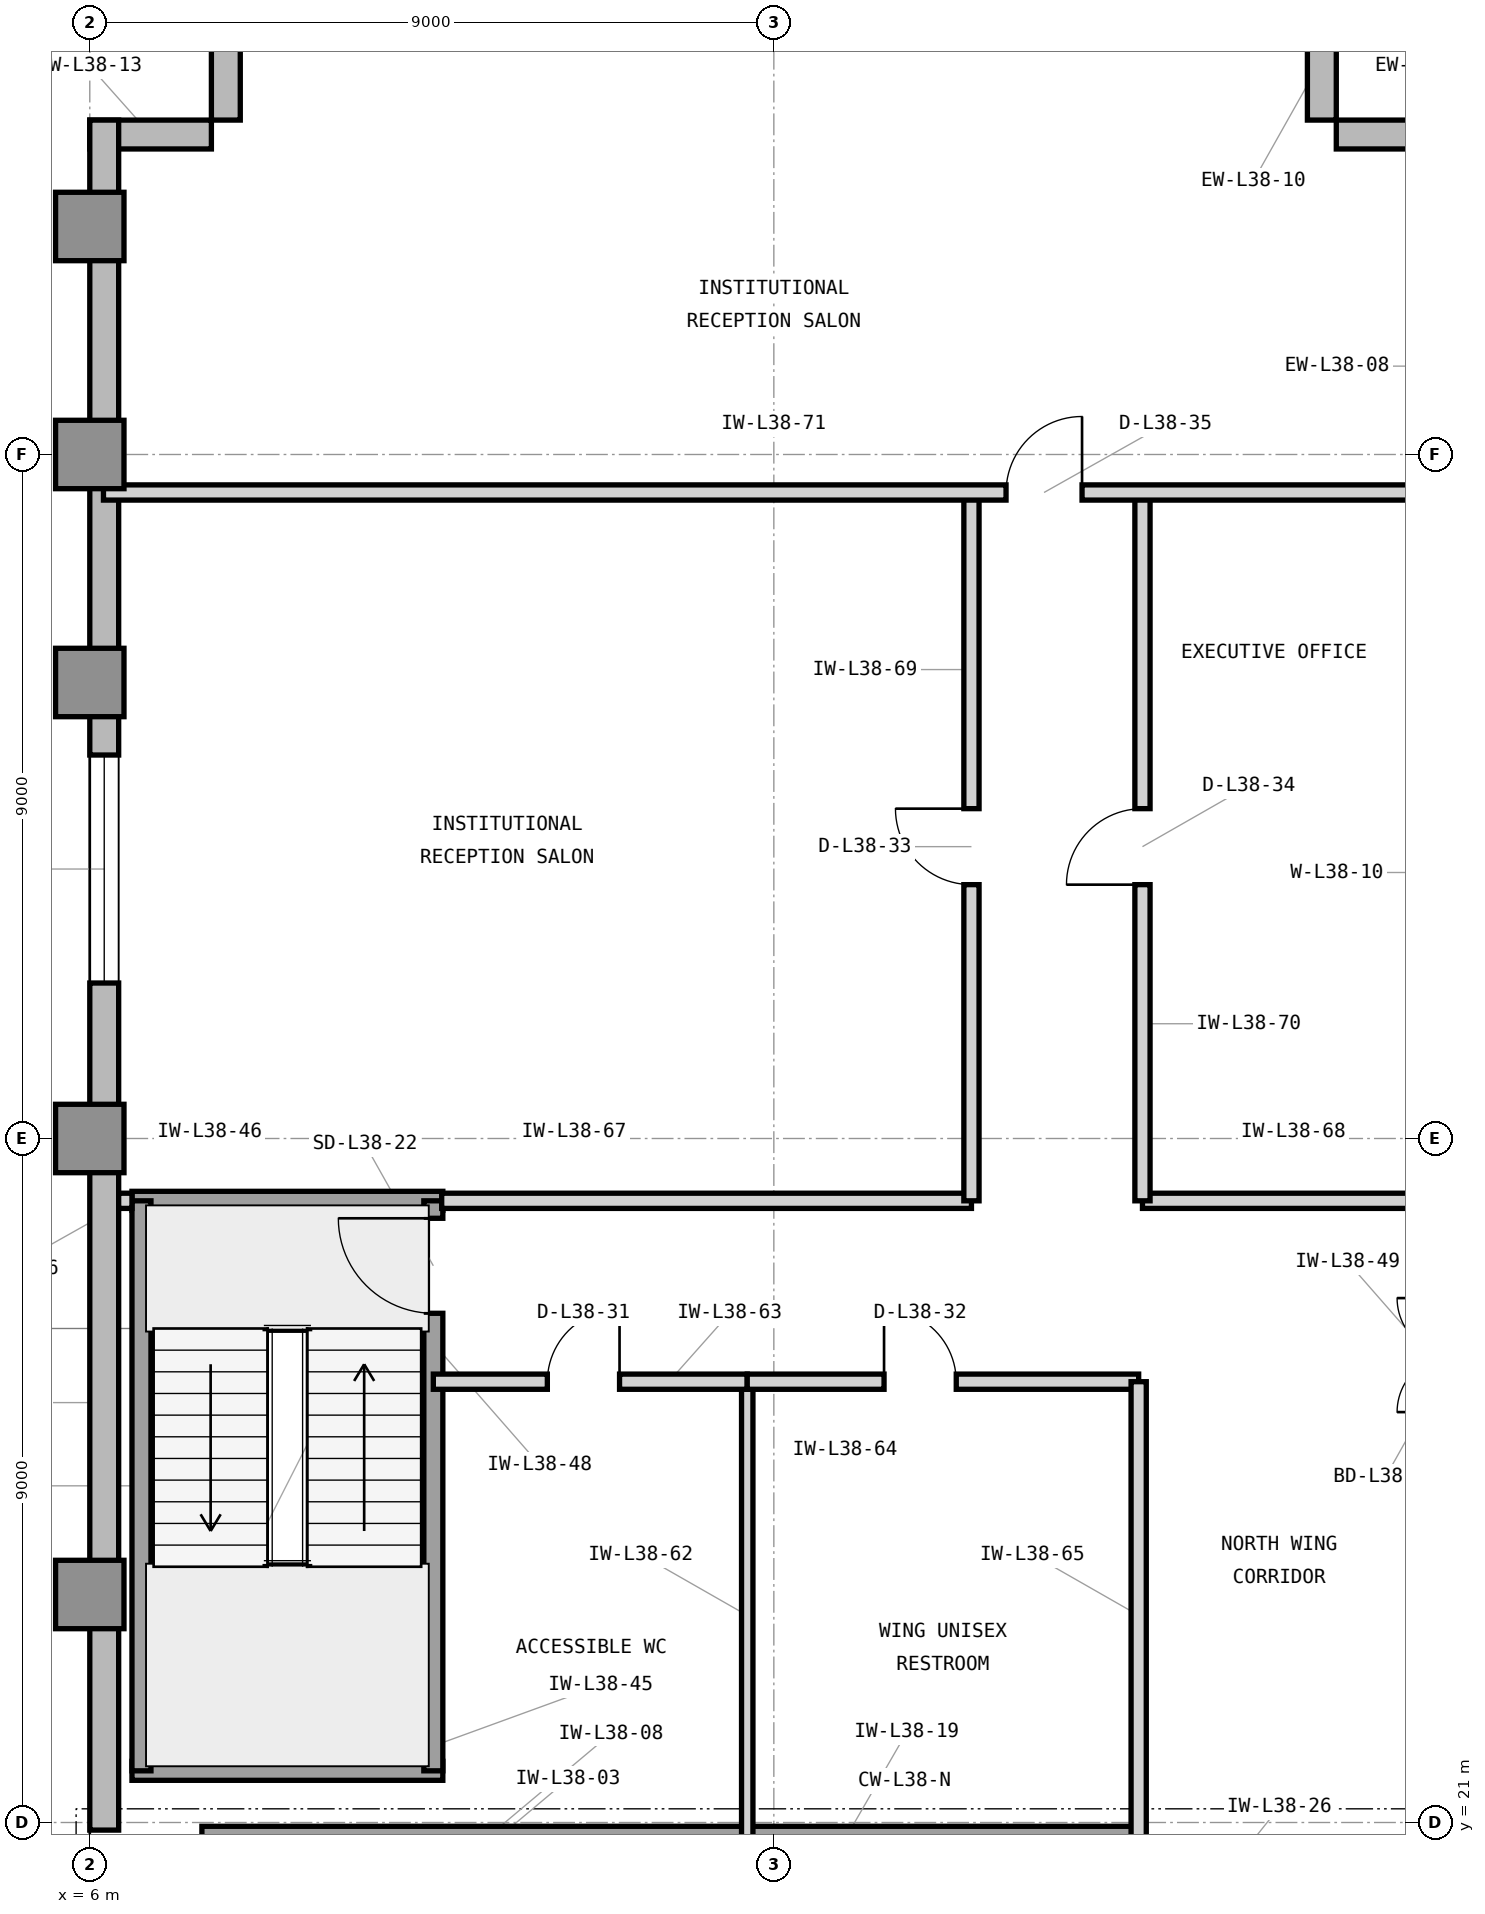
"""IFC4 building model, lengths in metres.
Left out: names, types, materials, properties, quantities, classifications, styles, units other than length and angle.
Written with IfcOpenShell. Run it as: python <this file> out.ifc"""

import sys

from ifc_helpers import new_model, si_unit, direction, frame, frame_2d, origin, origin_2d, place, context, subcontext, project, spatial, rectangle, extrude, element, fill, save


model = new_model("IFC4")
c1 = context("Model", 3, precision=1e-05, world=origin(), true_north=direction((0.0, 1.0)))
c2 = subcontext(c1, "Body", "Model", "MODEL_VIEW")
j1 = project(units=[si_unit("LENGTHUNIT", "METRE"), si_unit("PLANEANGLEUNIT", "RADIAN")], contexts=[c1])
p1 = place(None, origin())
s1 = spatial("IfcSite", under=j1, at=p1, CompositionType="ELEMENT")
p2 = place(p1, origin())
s2 = spatial("IfcBuilding", under=s1, at=p2, CompositionType="ELEMENT")
p3 = place(p2, frame((0.0, 0.0, 160.2)))
s3 = spatial("IfcBuildingStorey", under=s2, at=p3, CompositionType="ELEMENT", Elevation=160.2)
p4 = place(p3, frame((7.475, 20.65, 0.0), z_axis=(0.0, 0.0, 1.0), x_axis=(1.0, 0.0, 0.0)))
e1 = element("IfcWall", 1, at=p4, inside=s3, PredefinedType="SHEAR", context=c2, shape_type="SweptSolid", body=[
    extrude(rectangle(XDim=12.325, YDim=0.6, at=frame_2d((6.163, 0.0))), origin(), (0.0, 0.0, 1.0), 4.2),
])
for number, where, z_axis, x_axis in (
    (2, (6.0, 24.0, 0.0), (0.0, 0.0, 1.0), (1.0, 0.0, 0.0)),
    (3, (6.0, 30.0, 0.0), (0.0, 0.0, 1.0), (1.0, 0.0, 0.0)),
    (4, (6.0, 36.0, 0.0), (0.0, 0.0, 1.0), (1.0, 0.0, 0.0)),
    (5, (6.0, 39.0, 0.0), (0.0, 0.0, 1.0), (1.0, 0.0, 0.0)),
    (6, (6.0, 42.0, 0.0), (0.0, 0.0, 1.0), (1.0, 0.0, 0.0)),
):
    element("IfcColumn", number, at=place(p3, frame(where, z_axis=z_axis, x_axis=x_axis)), inside=s3, PredefinedType="COLUMN", context=c2, shape_type="SweptSolid", body=[
        extrude(rectangle(XDim=0.9, YDim=0.9, at=origin_2d()), origin(), (0.0, 0.0, 1.0), 4.2),
    ])
for number, where, z_axis, x_axis in (
    (7, (24.0, 43.21, 0.0), (0.0, 0.0, 1.0), (-1.0, 0.0, 0.0)),
    (8, (22.21, 43.4, 0.0), (0.0, 0.0, 1.0), (0.0, 1.0, 0.0)),
    (9, (7.79, 45.0, 0.0), (0.0, 0.0, 1.0), (0.0, -1.0, 0.0)),
    (10, (7.6, 43.21, 0.0), (0.0, 0.0, 1.0), (-1.0, 0.0, 0.0)),
):
    element("IfcWall", number, at=place(p3, frame(where, z_axis=z_axis, x_axis=x_axis)), inside=s3, PredefinedType="STANDARD", context=c2, shape_type="SweptSolid", body=[
        extrude(rectangle(XDim=1.6, YDim=0.38, at=frame_2d((0.8, 0.0))), origin(), (0.0, 0.0, 1.0), 4.0),
    ])
p5 = place(p3, frame((6.19, 43.4, 0.0), z_axis=(0.0, 0.0, 1.0), x_axis=(0.0, -1.0, 0.0)))
e11 = element("IfcWall", 11, at=p5, inside=s3, PredefinedType="STANDARD", context=c2, shape_type="SweptSolid", body=[
    extrude(rectangle(XDim=22.5, YDim=0.38, at=frame_2d((11.25, 0.0))), origin(), (0.0, 0.0, 1.0), 4.0),
])
p6 = place(p5, frame((8.354, 0.0, 0.7)))
e12 = element("IfcOpeningElement", 12, at=p6, cuts=e11, PredefinedType="OPENING", context=c2, shape_type="SweptSolid", body=[
    extrude(rectangle(XDim=3.0, YDim=2.6, at=frame_2d((1.5, 1.3))), frame((0.0, 0.2, 0.0), z_axis=(0.0, -1.0, 0.0), x_axis=(1.0, 0.0, 0.0)), (0.0, 0.0, 1.0), 0.4),
])
for number, where, z_axis, x_axis in (
    (13, (6.555, 21.68, 0.0), (0.0, 0.0, 1.0), (1.0, 0.0, 0.0)),
    (14, (6.555, 29.18, 0.0), (0.0, 0.0, 1.0), (1.0, 0.0, 0.0)),
):
    element("IfcWall", number, at=place(p3, frame(where, z_axis=z_axis, x_axis=x_axis)), inside=s3, PredefinedType="SHEAR", context=c2, shape_type="SweptSolid", body=[
        extrude(rectangle(XDim=4.09, YDim=0.25, at=frame_2d((2.045, 0.0))), origin(), (0.0, 0.0, 1.0), 4.2),
    ])
p7 = place(p3, frame((6.68, 21.68, 0.0), z_axis=(0.0, 0.0, 1.0), x_axis=(0.0, 1.0, 0.0)))
e15 = element("IfcWall", 15, at=p7, inside=s3, PredefinedType="SHEAR", context=c2, shape_type="SweptSolid", body=[
    extrude(rectangle(XDim=7.5, YDim=0.25, at=frame_2d((3.75, 0.0))), origin(), (0.0, 0.0, 1.0), 4.2),
])
p8 = place(p3, frame((10.52, 21.68, 0.0), z_axis=(0.0, 0.0, 1.0), x_axis=(0.0, 1.0, 0.0)))
e16 = element("IfcWall", 16, at=p8, inside=s3, PredefinedType="SHEAR", context=c2, shape_type="SweptSolid", body=[
    extrude(rectangle(XDim=7.5, YDim=0.25, at=frame_2d((3.75, 0.0))), origin(), (0.0, 0.0, 1.0), 4.2),
])
p9 = place(p8, frame((6.02, 0.0, 0.0)))
e17 = element("IfcOpeningElement", 17, at=p9, cuts=e16, PredefinedType="OPENING", context=c2, shape_type="SweptSolid", body=[
    extrude(rectangle(XDim=1.25, YDim=2.2, at=frame_2d((0.625, 1.1))), frame((0.0, 0.135, 0.0), z_axis=(0.0, -1.0, 0.0), x_axis=(1.0, 0.0, 0.0)), (0.0, 0.0, 1.0), 0.27),
])
p10 = place(p3, frame((14.65, 20.65, 0.0), z_axis=(0.0, 0.0, 1.0), x_axis=(0.0, 1.0, 0.0)))
e18 = element("IfcWall", 18, at=p10, inside=s3, PredefinedType="PARTITIONING", context=c2, shape_type="SweptSolid", body=[
    extrude(rectangle(XDim=6.15, YDim=0.15, at=frame_2d((3.075, 0.0))), origin(), (0.0, 0.0, 1.0), 3.93),
])
p11 = place(p3, frame((10.52, 26.8, 0.0), z_axis=(0.0, 0.0, 1.0), x_axis=(1.0, 0.0, 0.0)))
e19 = element("IfcWall", 19, at=p11, inside=s3, PredefinedType="PARTITIONING", context=c2, shape_type="SweptSolid", body=[
    extrude(rectangle(XDim=4.13, YDim=0.2, at=frame_2d((2.065, 0.0))), origin(), (0.0, 0.0, 1.0), 3.93),
])
p12 = place(p11, frame((1.5, 0.0, 0.0)))
e20 = element("IfcOpeningElement", 20, at=p12, cuts=e19, PredefinedType="OPENING", context=c2, shape_type="SweptSolid", body=[
    extrude(rectangle(XDim=0.95, YDim=2.1, at=frame_2d((0.475, 1.05))), frame((0.0, 0.11, 0.0), z_axis=(0.0, -1.0, 0.0), x_axis=(1.0, 0.0, 0.0)), (0.0, 0.0, 1.0), 0.22),
])
p13 = place(p3, frame((14.65, 26.8, 0.0), z_axis=(0.0, 0.0, 1.0), x_axis=(1.0, 0.0, 0.0)))
e21 = element("IfcWall", 21, at=p13, inside=s3, PredefinedType="PARTITIONING", context=c2, shape_type="SweptSolid", body=[
    extrude(rectangle(XDim=5.15, YDim=0.2, at=frame_2d((2.575, 0.0))), origin(), (0.0, 0.0, 1.0), 3.93),
])
p14 = place(p13, frame((1.8, 0.0, 0.0)))
e22 = element("IfcOpeningElement", 22, at=p14, cuts=e21, PredefinedType="OPENING", context=c2, shape_type="SweptSolid", body=[
    extrude(rectangle(XDim=0.95, YDim=2.1, at=frame_2d((0.475, 1.05))), frame((0.0, 0.11, 0.0), z_axis=(0.0, -1.0, 0.0), x_axis=(1.0, 0.0, 0.0)), (0.0, 0.0, 1.0), 0.22),
])
p15 = place(p3, frame((19.8, 20.65, 0.0), z_axis=(0.0, 0.0, 1.0), x_axis=(0.0, 1.0, 0.0)))
e23 = element("IfcWall", 23, at=p15, inside=s3, PredefinedType="PARTITIONING", context=c2, shape_type="SweptSolid", body=[
    extrude(rectangle(XDim=6.15, YDim=0.2, at=frame_2d((3.075, 0.0))), origin(), (0.0, 0.0, 1.0), 3.93),
])
p16 = place(p3, frame((6.38, 29.18, 0.0), z_axis=(0.0, 0.0, 1.0), x_axis=(1.0, 0.0, 0.0)))
e24 = element("IfcWall", 24, at=p16, inside=s3, PredefinedType="PARTITIONING", context=c2, shape_type="SweptSolid", body=[
    extrude(rectangle(XDim=0.175, YDim=0.2, at=frame_2d((0.087, 0.0))), origin(), (0.0, 0.0, 1.0), 3.93),
])
p17 = place(p3, frame((10.63, 29.18, 0.0), z_axis=(0.0, 0.0, 1.0), x_axis=(1.0, 0.0, 0.0)))
e25 = element("IfcWall", 25, at=p17, inside=s3, PredefinedType="PARTITIONING", context=c2, shape_type="SweptSolid", body=[
    extrude(rectangle(XDim=6.97, YDim=0.2, at=frame_2d((3.485, 0.0))), origin(), (0.0, 0.0, 1.0), 3.93),
])
p18 = place(p3, frame((19.85, 29.18, 0.0), z_axis=(0.0, 0.0, 1.0), x_axis=(1.0, 0.0, 0.0)))
e26 = element("IfcWall", 26, at=p18, inside=s3, PredefinedType="PARTITIONING", context=c2, shape_type="SweptSolid", body=[
    extrude(rectangle(XDim=3.97, YDim=0.2, at=frame_2d((1.985, 0.0))), origin(), (0.0, 0.0, 1.0), 3.93),
])
p19 = place(p3, frame((17.6, 29.18, 0.0), z_axis=(0.0, 0.0, 1.0), x_axis=(0.0, 1.0, 0.0)))
e27 = element("IfcWall", 27, at=p19, inside=s3, PredefinedType="PARTITIONING", context=c2, shape_type="SweptSolid", body=[
    extrude(rectangle(XDim=9.32, YDim=0.2, at=frame_2d((4.66, 0.0))), origin(), (0.0, 0.0, 1.0), 3.93),
])
p20 = place(p19, frame((4.16, 0.0, 0.0)))
e28 = element("IfcOpeningElement", 28, at=p20, cuts=e27, PredefinedType="OPENING", context=c2, shape_type="SweptSolid", body=[
    extrude(rectangle(XDim=1.0, YDim=2.15, at=frame_2d((0.5, 1.075))), frame((0.0, 0.11, 0.0), z_axis=(0.0, -1.0, 0.0), x_axis=(1.0, 0.0, 0.0)), (0.0, 0.0, 1.0), 0.22),
])
p21 = place(p3, frame((19.85, 29.18, 0.0), z_axis=(0.0, 0.0, 1.0), x_axis=(0.0, 1.0, 0.0)))
e29 = element("IfcWall", 29, at=p21, inside=s3, PredefinedType="PARTITIONING", context=c2, shape_type="SweptSolid", body=[
    extrude(rectangle(XDim=9.32, YDim=0.2, at=frame_2d((4.66, 0.0))), origin(), (0.0, 0.0, 1.0), 3.93),
])
p22 = place(p21, frame((4.16, 0.0, 0.0)))
e30 = element("IfcOpeningElement", 30, at=p22, cuts=e29, PredefinedType="OPENING", context=c2, shape_type="SweptSolid", body=[
    extrude(rectangle(XDim=1.0, YDim=2.15, at=frame_2d((0.5, 1.075))), frame((0.0, 0.11, 0.0), z_axis=(0.0, -1.0, 0.0), x_axis=(1.0, 0.0, 0.0)), (0.0, 0.0, 1.0), 0.22),
])
p23 = place(p3, frame((6.18, 38.5, 0.0), z_axis=(0.0, 0.0, 1.0), x_axis=(1.0, 0.0, 0.0)))
e31 = element("IfcWall", 31, at=p23, inside=s3, PredefinedType="PARTITIONING", context=c2, shape_type="SweptSolid", body=[
    extrude(rectangle(XDim=17.64, YDim=0.2, at=frame_2d((8.82, 0.0))), origin(), (0.0, 0.0, 1.0), 3.93),
])
p24 = place(p23, frame((11.875, 0.0, 0.0)))
e32 = element("IfcOpeningElement", 32, at=p24, cuts=e31, PredefinedType="OPENING", context=c2, shape_type="SweptSolid", body=[
    extrude(rectangle(XDim=1.0, YDim=2.15, at=frame_2d((0.5, 1.075))), frame((0.0, 0.11, 0.0), z_axis=(0.0, -1.0, 0.0), x_axis=(1.0, 0.0, 0.0)), (0.0, 0.0, 1.0), 0.22),
])
p25 = place(p9, origin())
e33 = element("IfcDoor", 33, at=p25, inside=s3, OperationType="SINGLE_SWING_RIGHT", PredefinedType="DOOR", context=c2, shape_type="SweptSolid", body=[
    extrude(rectangle(XDim=1.25, YDim=2.2, at=frame_2d((0.625, 1.1))), frame((0.0, 0.025, 0.0), z_axis=(0.0, -1.0, 0.0), x_axis=(1.0, 0.0, 0.0)), (0.0, 0.0, 1.0), 0.05),
])
fill(e17, e33)
p26 = place(p12, origin())
e34 = element("IfcDoor", 34, at=p26, inside=s3, OperationType="SINGLE_SWING_RIGHT", PredefinedType="DOOR", context=c2, shape_type="SweptSolid", body=[
    extrude(rectangle(XDim=0.95, YDim=2.1, at=frame_2d((0.475, 1.05))), frame((0.0, 0.025, 0.0), z_axis=(0.0, -1.0, 0.0), x_axis=(1.0, 0.0, 0.0)), (0.0, 0.0, 1.0), 0.05),
])
fill(e20, e34)
p27 = place(p14, origin())
e35 = element("IfcDoor", 35, at=p27, inside=s3, OperationType="SINGLE_SWING_LEFT", PredefinedType="DOOR", context=c2, shape_type="SweptSolid", body=[
    extrude(rectangle(XDim=0.95, YDim=2.1, at=frame_2d((0.475, 1.05))), frame((0.0, 0.025, 0.0), z_axis=(0.0, -1.0, 0.0), x_axis=(1.0, 0.0, 0.0)), (0.0, 0.0, 1.0), 0.05),
])
fill(e22, e35)
p28 = place(p20, origin())
e36 = element("IfcDoor", 36, at=p28, inside=s3, OperationType="SINGLE_SWING_RIGHT", PredefinedType="DOOR", context=c2, shape_type="SweptSolid", body=[
    extrude(rectangle(XDim=1.0, YDim=2.15, at=frame_2d((0.5, 1.075))), frame((0.0, 0.025, 0.0), z_axis=(0.0, -1.0, 0.0), x_axis=(1.0, 0.0, 0.0)), (0.0, 0.0, 1.0), 0.05),
])
fill(e28, e36)
p29 = place(p22, origin())
e37 = element("IfcDoor", 37, at=p29, inside=s3, OperationType="SINGLE_SWING_LEFT", PredefinedType="DOOR", context=c2, shape_type="SweptSolid", body=[
    extrude(rectangle(XDim=1.0, YDim=2.15, at=frame_2d((0.5, 1.075))), frame((0.0, 0.025, 0.0), z_axis=(0.0, -1.0, 0.0), x_axis=(1.0, 0.0, 0.0)), (0.0, 0.0, 1.0), 0.05),
])
fill(e30, e37)
p30 = place(p24, origin())
e38 = element("IfcDoor", 38, at=p30, inside=s3, OperationType="SINGLE_SWING_RIGHT", PredefinedType="DOOR", context=c2, shape_type="SweptSolid", body=[
    extrude(rectangle(XDim=1.0, YDim=2.15, at=frame_2d((0.5, 1.075))), frame((0.0, 0.025, 0.0), z_axis=(0.0, -1.0, 0.0), x_axis=(1.0, 0.0, 0.0)), (0.0, 0.0, 1.0), 0.05),
])
fill(e32, e38)
p31 = place(p6, origin())
e39 = element("IfcWindow", 39, at=p31, inside=s3, PartitioningType="SINGLE_PANEL", PredefinedType="WINDOW", context=c2, shape_type="SweptSolid", body=[
    extrude(rectangle(XDim=3.0, YDim=2.6, at=frame_2d((1.5, 1.3))), frame((0.0, 0.11, 0.0), z_axis=(0.0, -1.0, 0.0), x_axis=(1.0, 0.0, 0.0)), (0.0, 0.0, 1.0), 0.06),
])
fill(e12, e39)
save(model, sys.argv[1])
